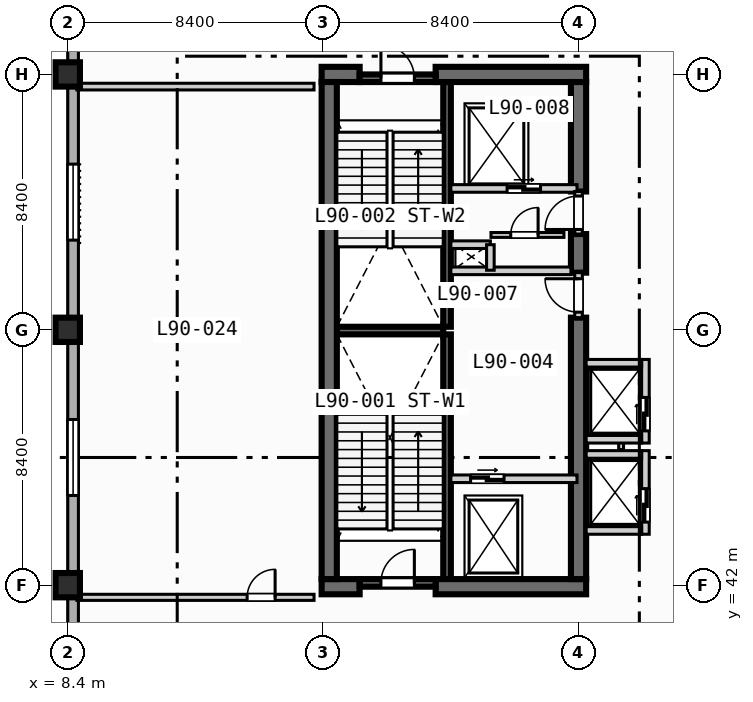
"""IFC4 building model, lengths in metres.
Left out: names, types, materials, properties, quantities, classifications, styles, units other than length and angle.
Written with IfcOpenShell. Run it as: python <this file> out.ifc"""

import sys

from ifc_helpers import new_model, si_unit, direction, frame, frame_2d, origin, origin_2d, place, context, subcontext, project, spatial, rectangle, extrude, element, fill, save


model = new_model("IFC4")
c1 = context("Model", 3, precision=1e-05, world=origin(), true_north=direction((0.0, 1.0)))
c2 = subcontext(c1, "Body", "Model", "MODEL_VIEW")
j1 = project(units=[si_unit("LENGTHUNIT", "METRE"), si_unit("PLANEANGLEUNIT", "RADIAN")], contexts=[c1])
p1 = place(None, origin())
s1 = spatial("IfcSite", under=j1, at=p1, CompositionType="ELEMENT")
p2 = place(p1, origin())
s2 = spatial("IfcBuilding", under=s1, at=p2, CompositionType="ELEMENT")
p3 = place(p2, frame((0.0, 0.0, 363.8)))
s3 = spatial("IfcBuildingStorey", under=s2, at=p3, CompositionType="ELEMENT", Elevation=363.8)
for number, where, z_axis, x_axis in (
    (1, (20.875, 42.2, 0.0), (0.0, 0.0, 1.0), (0.0, 1.0, 0.0)),
    (2, (20.875, 50.5, 0.0), (0.0, 0.0, 1.0), (0.0, 1.0, 0.0)),
):
    element("IfcWall", number, at=place(p3, frame(where, z_axis=z_axis, x_axis=x_axis)), inside=s3, PredefinedType="SOLIDWALL", context=c2, shape_type="SweptSolid", body=[
        extrude(rectangle(XDim=8.05, YDim=0.25, at=frame_2d((4.025, 0.0))), origin(), (0.0, 0.0, 1.0), 4.45),
    ])
p4 = place(p3, frame((17.25, 50.375, 0.0), z_axis=(0.0, 0.0, 1.0), x_axis=(1.0, 0.0, 0.0)))
e3 = element("IfcWall", 3, at=p4, inside=s3, PredefinedType="SOLIDWALL", context=c2, shape_type="SweptSolid", body=[
    extrude(rectangle(XDim=3.5, YDim=0.25, at=frame_2d((1.75, 0.0))), origin(), (0.0, 0.0, 1.0), 4.45),
])
p5 = place(p3, frame((16.75, 41.95, 0.0), z_axis=(0.0, 0.0, 1.0), x_axis=(1.0, 0.0, 0.0)))
e4 = element("IfcWall", 4, at=p5, inside=s3, PredefinedType="SHEAR", context=c2, shape_type="SweptSolid", body=[
    extrude(rectangle(XDim=1.25, YDim=0.5, at=frame_2d((0.625, 0.0))), origin(), (0.0, 0.0, 1.0), 4.45),
])
p6 = place(p3, frame((20.5, 41.95, 0.0), z_axis=(0.0, 0.0, 1.0), x_axis=(1.0, 0.0, 0.0)))
e5 = element("IfcWall", 5, at=p6, inside=s3, PredefinedType="SHEAR", context=c2, shape_type="SweptSolid", body=[
    extrude(rectangle(XDim=4.95, YDim=0.5, at=frame_2d((2.475, 0.0))), origin(), (0.0, 0.0, 1.0), 4.45),
])
p7 = place(p3, frame((16.75, 58.8, 0.0), z_axis=(0.0, 0.0, 1.0), x_axis=(1.0, 0.0, 0.0)))
e6 = element("IfcWall", 6, at=p7, inside=s3, PredefinedType="SHEAR", context=c2, shape_type="SweptSolid", body=[
    extrude(rectangle(XDim=1.25, YDim=0.5, at=frame_2d((0.625, 0.0))), origin(), (0.0, 0.0, 1.0), 4.45),
])
p8 = place(p3, frame((20.5, 58.8, 0.0), z_axis=(0.0, 0.0, 1.0), x_axis=(1.0, 0.0, 0.0)))
e7 = element("IfcWall", 7, at=p8, inside=s3, PredefinedType="SHEAR", context=c2, shape_type="SweptSolid", body=[
    extrude(rectangle(XDim=4.95, YDim=0.5, at=frame_2d((2.475, 0.0))), origin(), (0.0, 0.0, 1.0), 4.45),
])
p9 = place(p3, frame((17.0, 42.2, 0.0), z_axis=(0.0, 0.0, 1.0), x_axis=(0.0, 1.0, 0.0)))
e8 = element("IfcWall", 8, at=p9, inside=s3, PredefinedType="SHEAR", context=c2, shape_type="SweptSolid", body=[
    extrude(rectangle(XDim=16.35, YDim=0.5, at=frame_2d((8.175, 0.0))), origin(), (0.0, 0.0, 1.0), 4.45),
])
p10 = place(p3, frame((25.2, 42.2, 0.0), z_axis=(0.0, 0.0, 1.0), x_axis=(0.0, 1.0, 0.0)))
e9 = element("IfcWall", 9, at=p10, inside=s3, PredefinedType="SHEAR", context=c2, shape_type="SweptSolid", body=[
    extrude(rectangle(XDim=8.6, YDim=0.5, at=frame_2d((4.3, 0.0))), origin(), (0.0, 0.0, 1.0), 4.45),
])
p11 = place(p3, frame((25.2, 52.28, 0.0), z_axis=(0.0, 0.0, 1.0), x_axis=(0.0, 1.0, 0.0)))
e10 = element("IfcWall", 10, at=p11, inside=s3, PredefinedType="SHEAR", context=c2, shape_type="SweptSolid", body=[
    extrude(rectangle(XDim=1.27, YDim=0.5, at=frame_2d((0.635, 0.0))), origin(), (0.0, 0.0, 1.0), 4.45),
])
p12 = place(p3, frame((25.2, 54.95, 0.0), z_axis=(0.0, 0.0, 1.0), x_axis=(0.0, 1.0, 0.0)))
e11 = element("IfcWall", 11, at=p12, inside=s3, PredefinedType="SHEAR", context=c2, shape_type="SweptSolid", body=[
    extrude(rectangle(XDim=3.6, YDim=0.5, at=frame_2d((1.8, 0.0))), origin(), (0.0, 0.0, 1.0), 4.45),
])
for number, where, z_axis, x_axis in (
    (12, (8.4, 42.0, 0.0), (0.0, 0.0, 1.0), (1.0, 0.0, 0.0)),
    (13, (8.4, 50.4, 0.0), (0.0, 0.0, 1.0), (1.0, 0.0, 0.0)),
    (14, (8.4, 58.8, 0.0), (0.0, 0.0, 1.0), (1.0, 0.0, 0.0)),
):
    element("IfcColumn", number, at=place(p3, frame(where, z_axis=z_axis, x_axis=x_axis)), inside=s3, PredefinedType="COLUMN", context=c2, shape_type="SweptSolid", body=[
        extrude(rectangle(XDim=0.8, YDim=0.8, at=origin_2d()), origin(), (0.0, 0.0, 1.0), 4.8),
    ])
p13 = place(p3, frame((8.575, 11.575, 0.0), z_axis=(0.0, 0.0, 1.0), x_axis=(0.0, 1.0, 0.0)))
e15 = element("IfcWall", 15, at=p13, inside=s3, PredefinedType="STANDARD", context=c2, shape_type="SweptSolid", body=[
    extrude(rectangle(XDim=60.85, YDim=0.35, at=frame_2d((30.425, 0.0))), origin(), (0.0, 0.0, 1.0), 4.45),
])
p14 = place(p13, frame((8.175, 0.0, 0.85)))
e16 = element("IfcOpeningElement", 16, at=p14, cuts=e15, PredefinedType="OPENING", context=c2, shape_type="SweptSolid", body=[
    extrude(rectangle(XDim=2.5, YDim=2.2, at=frame_2d((1.25, 1.1))), frame((0.0, 0.185, 0.0), z_axis=(0.0, -1.0, 0.0), x_axis=(1.0, 0.0, 0.0)), (0.0, 0.0, 1.0), 0.37),
])
p15 = place(p13, frame((16.575, 0.0, 0.85)))
e17 = element("IfcOpeningElement", 17, at=p15, cuts=e15, PredefinedType="OPENING", context=c2, shape_type="SweptSolid", body=[
    extrude(rectangle(XDim=2.5, YDim=2.2, at=frame_2d((1.25, 1.1))), frame((0.0, 0.185, 0.0), z_axis=(0.0, -1.0, 0.0), x_axis=(1.0, 0.0, 0.0)), (0.0, 0.0, 1.0), 0.37),
])
p16 = place(p13, frame((24.975, 0.0, 0.85)))
e18 = element("IfcOpeningElement", 18, at=p16, cuts=e15, PredefinedType="OPENING", context=c2, shape_type="SweptSolid", body=[
    extrude(rectangle(XDim=2.5, YDim=2.2, at=frame_2d((1.25, 1.1))), frame((0.0, 0.185, 0.0), z_axis=(0.0, -1.0, 0.0), x_axis=(1.0, 0.0, 0.0)), (0.0, 0.0, 1.0), 0.37),
])
p17 = place(p13, frame((33.375, 0.0, 0.85)))
e19 = element("IfcOpeningElement", 19, at=p17, cuts=e15, PredefinedType="OPENING", context=c2, shape_type="SweptSolid", body=[
    extrude(rectangle(XDim=2.5, YDim=2.2, at=frame_2d((1.25, 1.1))), frame((0.0, 0.185, 0.0), z_axis=(0.0, -1.0, 0.0), x_axis=(1.0, 0.0, 0.0)), (0.0, 0.0, 1.0), 0.37),
])
p18 = place(p13, frame((41.775, 0.0, 0.85)))
e20 = element("IfcOpeningElement", 20, at=p18, cuts=e15, PredefinedType="OPENING", context=c2, shape_type="SweptSolid", body=[
    extrude(rectangle(XDim=2.5, YDim=2.2, at=frame_2d((1.25, 1.1))), frame((0.0, 0.185, 0.0), z_axis=(0.0, -1.0, 0.0), x_axis=(1.0, 0.0, 0.0)), (0.0, 0.0, 1.0), 0.37),
])
p19 = place(p3, frame((18.0, 42.075, 0.0), z_axis=(0.0, 0.0, 1.0), x_axis=(1.0, 0.0, 0.0)))
e21 = element("IfcWall", 21, at=p19, inside=s3, PredefinedType="SOLIDWALL", context=c2, shape_type="SweptSolid", body=[
    extrude(rectangle(XDim=2.5, YDim=0.25, at=frame_2d((1.25, 0.0))), origin(), (0.0, 0.0, 1.0), 4.45),
])
p20 = place(p19, frame((0.7, 0.0, 0.0)))
e22 = element("IfcOpeningElement", 22, at=p20, cuts=e21, PredefinedType="OPENING", context=c2, shape_type="SweptSolid", body=[
    extrude(rectangle(XDim=1.1, YDim=2.15, at=frame_2d((0.55, 1.075))), frame((0.0, 0.135, 0.0), z_axis=(0.0, -1.0, 0.0), x_axis=(1.0, 0.0, 0.0)), (0.0, 0.0, 1.0), 0.27),
])
p21 = place(p3, frame((18.0, 58.675, 0.0), z_axis=(0.0, 0.0, 1.0), x_axis=(1.0, 0.0, 0.0)))
e23 = element("IfcWall", 23, at=p21, inside=s3, PredefinedType="SOLIDWALL", context=c2, shape_type="SweptSolid", body=[
    extrude(rectangle(XDim=2.5, YDim=0.25, at=frame_2d((1.25, 0.0))), origin(), (0.0, 0.0, 1.0), 4.45),
])
p22 = place(p21, frame((0.7, 0.0, 0.0)))
e24 = element("IfcOpeningElement", 24, at=p22, cuts=e23, PredefinedType="OPENING", context=c2, shape_type="SweptSolid", body=[
    extrude(rectangle(XDim=1.1, YDim=2.15, at=frame_2d((0.55, 1.075))), frame((0.0, 0.135, 0.0), z_axis=(0.0, -1.0, 0.0), x_axis=(1.0, 0.0, 0.0)), (0.0, 0.0, 1.0), 0.27),
])
p23 = place(p3, frame((21.0, 45.5, 0.0), z_axis=(0.0, 0.0, 1.0), x_axis=(1.0, 0.0, 0.0)))
e25 = element("IfcWall", 25, at=p23, inside=s3, PredefinedType="SOLIDWALL", context=c2, shape_type="SweptSolid", body=[
    extrude(rectangle(XDim=4.15, YDim=0.25, at=frame_2d((2.075, 0.0))), origin(), (0.0, 0.0, 1.0), 4.45),
])
p24 = place(p23, frame((0.65, 0.0, 0.0)))
e26 = element("IfcOpeningElement", 26, at=p24, cuts=e25, PredefinedType="OPENING", context=c2, shape_type="SweptSolid", body=[
    extrude(rectangle(XDim=1.1, YDim=2.15, at=frame_2d((0.55, 1.075))), frame((0.0, 0.135, 0.0), z_axis=(0.0, -1.0, 0.0), x_axis=(1.0, 0.0, 0.0)), (0.0, 0.0, 1.0), 0.27),
])
p25 = place(p3, frame((25.2, 50.8, 0.0), z_axis=(0.0, 0.0, 1.0), x_axis=(0.0, 1.0, 0.0)))
e27 = element("IfcWall", 27, at=p25, inside=s3, PredefinedType="SOLIDWALL", context=c2, shape_type="SweptSolid", body=[
    extrude(rectangle(XDim=1.48, YDim=0.25, at=frame_2d((0.74, 0.0))), origin(), (0.0, 0.0, 1.0), 4.45),
])
p26 = place(p25, frame((0.18, 0.0, 0.0)))
e28 = element("IfcOpeningElement", 28, at=p26, cuts=e27, PredefinedType="OPENING", context=c2, shape_type="SweptSolid", body=[
    extrude(rectangle(XDim=1.1, YDim=2.15, at=frame_2d((0.55, 1.075))), frame((0.0, 0.135, 0.0), z_axis=(0.0, -1.0, 0.0), x_axis=(1.0, 0.0, 0.0)), (0.0, 0.0, 1.0), 0.27),
])
p27 = place(p3, frame((21.0, 52.34, 0.0), z_axis=(0.0, 0.0, 1.0), x_axis=(1.0, 0.0, 0.0)))
e29 = element("IfcWall", 29, at=p27, inside=s3, PredefinedType="SOLIDWALL", context=c2, shape_type="SweptSolid", body=[
    extrude(rectangle(XDim=3.95, YDim=0.25, at=frame_2d((1.975, 0.0))), origin(), (0.0, 0.0, 1.0), 4.45),
])
p28 = place(p3, frame((21.0, 55.05, 0.0), z_axis=(0.0, 0.0, 1.0), x_axis=(1.0, 0.0, 0.0)))
e30 = element("IfcWall", 30, at=p28, inside=s3, PredefinedType="SOLIDWALL", context=c2, shape_type="SweptSolid", body=[
    extrude(rectangle(XDim=4.15, YDim=0.25, at=frame_2d((2.075, 0.0))), origin(), (0.0, 0.0, 1.0), 4.45),
])
p29 = place(p28, frame((1.85, 0.0, 0.0)))
e31 = element("IfcOpeningElement", 31, at=p29, cuts=e30, PredefinedType="OPENING", context=c2, shape_type="SweptSolid", body=[
    extrude(rectangle(XDim=1.1, YDim=2.15, at=frame_2d((0.55, 1.075))), frame((0.0, 0.135, 0.0), z_axis=(0.0, -1.0, 0.0), x_axis=(1.0, 0.0, 0.0)), (0.0, 0.0, 1.0), 0.27),
])
p30 = place(p3, frame((25.2, 53.55, 0.0), z_axis=(0.0, 0.0, 1.0), x_axis=(0.0, 1.0, 0.0)))
e32 = element("IfcWall", 32, at=p30, inside=s3, PredefinedType="SOLIDWALL", context=c2, shape_type="SweptSolid", body=[
    extrude(rectangle(XDim=1.4, YDim=0.25, at=frame_2d((0.7, 0.0))), origin(), (0.0, 0.0, 1.0), 4.45),
])
p31 = place(p30, frame((0.15, 0.0, 0.0)))
e33 = element("IfcOpeningElement", 33, at=p31, cuts=e32, PredefinedType="OPENING", context=c2, shape_type="SweptSolid", body=[
    extrude(rectangle(XDim=1.1, YDim=2.15, at=frame_2d((0.55, 1.075))), frame((0.0, 0.135, 0.0), z_axis=(0.0, -1.0, 0.0), x_axis=(1.0, 0.0, 0.0)), (0.0, 0.0, 1.0), 0.27),
])
p32 = place(p3, frame((21.0, 53.2, 0.0), z_axis=(0.0, 0.0, 1.0), x_axis=(1.0, 0.0, 0.0)))
e34 = element("IfcWall", 34, at=p32, inside=s3, PredefinedType="SOLIDWALL", context=c2, shape_type="SweptSolid", body=[
    extrude(rectangle(XDim=1.3, YDim=0.25, at=frame_2d((0.65, 0.0))), origin(), (0.0, 0.0, 1.0), 4.45),
])
p33 = place(p3, frame((22.3, 52.36, 0.0), z_axis=(0.0, 0.0, 1.0), x_axis=(0.0, 1.0, 0.0)))
e35 = element("IfcWall", 35, at=p33, inside=s3, PredefinedType="SOLIDWALL", context=c2, shape_type="SweptSolid", body=[
    extrude(rectangle(XDim=0.84, YDim=0.25, at=frame_2d((0.42, 0.0))), origin(), (0.0, 0.0, 1.0), 4.45),
])
p34 = place(p3, frame((22.32, 53.52, 0.0), z_axis=(0.0, 0.0, 1.0), x_axis=(1.0, 0.0, 0.0)))
e36 = element("IfcWall", 36, at=p34, inside=s3, PredefinedType="PARTITIONING", context=c2, shape_type="SweptSolid", body=[
    extrude(rectangle(XDim=2.4, YDim=0.16, at=frame_2d((1.2, 0.0))), origin(), (0.0, 0.0, 1.0), 4.45),
])
p35 = place(p34, frame((0.65, 0.0, 0.0)))
e37 = element("IfcOpeningElement", 37, at=p35, cuts=e36, PredefinedType="OPENING", context=c2, shape_type="SweptSolid", body=[
    extrude(rectangle(XDim=0.9, YDim=2.1, at=frame_2d((0.45, 1.05))), frame((0.0, 0.09, 0.0), z_axis=(0.0, -1.0, 0.0), x_axis=(1.0, 0.0, 0.0)), (0.0, 0.0, 1.0), 0.18),
])
p36 = place(p3, frame((27.4, 43.675, 0.0), z_axis=(0.0, 0.0, 1.0), x_axis=(0.0, 1.0, 0.0)))
e38 = element("IfcWall", 38, at=p36, inside=s3, PredefinedType="SOLIDWALL", context=c2, shape_type="SweptSolid", body=[
    extrude(rectangle(XDim=2.75, YDim=0.25, at=frame_2d((1.375, 0.0))), origin(), (0.0, 0.0, 1.0), 4.45),
])
p37 = place(p36, frame((0.4, 0.0, 0.0)))
e39 = element("IfcOpeningElement", 39, at=p37, cuts=e38, PredefinedType="OPENING", context=c2, shape_type="SweptSolid", body=[
    extrude(rectangle(XDim=1.1, YDim=2.15, at=frame_2d((0.55, 1.075))), frame((0.0, 0.135, 0.0), z_axis=(0.0, -1.0, 0.0), x_axis=(1.0, 0.0, 0.0)), (0.0, 0.0, 1.0), 0.27),
])
for number, where, z_axis, x_axis in (
    (40, (25.45, 43.8, 0.0), (0.0, 0.0, 1.0), (1.0, 0.0, 0.0)),
    (41, (25.45, 46.3, 0.0), (0.0, 0.0, 1.0), (1.0, 0.0, 0.0)),
):
    element("IfcWall", number, at=place(p3, frame(where, z_axis=z_axis, x_axis=x_axis)), inside=s3, PredefinedType="SOLIDWALL", context=c2, shape_type="SweptSolid", body=[
        extrude(rectangle(XDim=1.825, YDim=0.25, at=frame_2d((0.913, 0.0))), origin(), (0.0, 0.0, 1.0), 4.45),
    ])
p38 = place(p3, frame((26.6, 46.46, 0.0), z_axis=(0.0, 0.0, 1.0), x_axis=(0.0, 1.0, 0.0)))
e42 = element("IfcWall", 42, at=p38, inside=s3, PredefinedType="PARTITIONING", context=c2, shape_type="SweptSolid", body=[
    extrude(rectangle(XDim=0.88, YDim=0.16, at=frame_2d((0.44, 0.0))), origin(), (0.0, 0.0, 1.0), 4.45),
])
p39 = place(p3, frame((27.4, 46.675, 0.0), z_axis=(0.0, 0.0, 1.0), x_axis=(0.0, 1.0, 0.0)))
e43 = element("IfcWall", 43, at=p39, inside=s3, PredefinedType="SOLIDWALL", context=c2, shape_type="SweptSolid", body=[
    extrude(rectangle(XDim=2.75, YDim=0.25, at=frame_2d((1.375, 0.0))), origin(), (0.0, 0.0, 1.0), 4.45),
])
p40 = place(p39, frame((0.4, 0.0, 0.0)))
e44 = element("IfcOpeningElement", 44, at=p40, cuts=e43, PredefinedType="OPENING", context=c2, shape_type="SweptSolid", body=[
    extrude(rectangle(XDim=1.1, YDim=2.15, at=frame_2d((0.55, 1.075))), frame((0.0, 0.135, 0.0), z_axis=(0.0, -1.0, 0.0), x_axis=(1.0, 0.0, 0.0)), (0.0, 0.0, 1.0), 0.27),
])
for number, where, z_axis, x_axis in (
    (45, (25.45, 46.8, 0.0), (0.0, 0.0, 1.0), (1.0, 0.0, 0.0)),
    (46, (25.45, 49.3, 0.0), (0.0, 0.0, 1.0), (1.0, 0.0, 0.0)),
):
    element("IfcWall", number, at=place(p3, frame(where, z_axis=z_axis, x_axis=x_axis)), inside=s3, PredefinedType="SOLIDWALL", context=c2, shape_type="SweptSolid", body=[
        extrude(rectangle(XDim=1.825, YDim=0.25, at=frame_2d((0.913, 0.0))), origin(), (0.0, 0.0, 1.0), 4.45),
    ])
p41 = place(p3, frame((8.7, 41.6, 0.0), z_axis=(0.0, 0.0, 1.0), x_axis=(1.0, 0.0, 0.0)))
e47 = element("IfcWall", 47, at=p41, inside=s3, PredefinedType="PARTITIONING", context=c2, shape_type="SweptSolid", body=[
    extrude(rectangle(XDim=7.8, YDim=0.2, at=frame_2d((3.9, 0.0))), origin(), (0.0, 0.0, 1.0), 4.45),
])
p42 = place(p41, frame((5.6, 0.0, 0.0)))
e48 = element("IfcOpeningElement", 48, at=p42, cuts=e47, PredefinedType="OPENING", context=c2, shape_type="SweptSolid", body=[
    extrude(rectangle(XDim=0.92, YDim=2.1, at=frame_2d((0.46, 1.05))), frame((0.0, 0.11, 0.0), z_axis=(0.0, -1.0, 0.0), x_axis=(1.0, 0.0, 0.0)), (0.0, 0.0, 1.0), 0.22),
])
p43 = place(p3, frame((8.7, 58.4, 0.0), z_axis=(0.0, 0.0, 1.0), x_axis=(1.0, 0.0, 0.0)))
e49 = element("IfcWall", 49, at=p43, inside=s3, PredefinedType="PARTITIONING", context=c2, shape_type="SweptSolid", body=[
    extrude(rectangle(XDim=7.8, YDim=0.22, at=frame_2d((3.9, 0.0))), origin(), (0.0, 0.0, 1.0), 4.45),
])
p44 = place(p17, origin())
e50 = element("IfcWindow", 50, at=p44, inside=s3, PartitioningType="SINGLE_PANEL", PredefinedType="WINDOW", context=c2, shape_type="SweptSolid", body=[
    extrude(rectangle(XDim=2.5, YDim=2.2, at=frame_2d((1.25, 1.1))), frame((0.0, 0.03, 0.0), z_axis=(0.0, -1.0, 0.0), x_axis=(1.0, 0.0, 0.0)), (0.0, 0.0, 1.0), 0.06),
])
fill(e19, e50)
p45 = place(p18, origin())
e51 = element("IfcWindow", 51, at=p45, inside=s3, PartitioningType="SINGLE_PANEL", PredefinedType="WINDOW", context=c2, shape_type="SweptSolid", body=[
    extrude(rectangle(XDim=2.5, YDim=2.2, at=frame_2d((1.25, 1.1))), frame((0.0, 0.03, 0.0), z_axis=(0.0, -1.0, 0.0), x_axis=(1.0, 0.0, 0.0)), (0.0, 0.0, 1.0), 0.06),
])
fill(e20, e51)
p46 = place(p20, origin())
e52 = element("IfcDoor", 52, at=p46, inside=s3, OperationType="SINGLE_SWING_RIGHT", PredefinedType="DOOR", context=c2, shape_type="SweptSolid", body=[
    extrude(rectangle(XDim=1.1, YDim=2.15, at=frame_2d((0.55, 1.075))), frame((0.0, 0.025, 0.0), z_axis=(0.0, -1.0, 0.0), x_axis=(1.0, 0.0, 0.0)), (0.0, 0.0, 1.0), 0.05),
])
fill(e22, e52)
p47 = place(p22, origin())
e53 = element("IfcDoor", 53, at=p47, inside=s3, OperationType="SINGLE_SWING_LEFT", PredefinedType="DOOR", context=c2, shape_type="SweptSolid", body=[
    extrude(rectangle(XDim=1.1, YDim=2.15, at=frame_2d((0.55, 1.075))), frame((0.0, 0.025, 0.0), z_axis=(0.0, -1.0, 0.0), x_axis=(1.0, 0.0, 0.0)), (0.0, 0.0, 1.0), 0.05),
])
fill(e24, e53)
p48 = place(p24, origin())
e54 = element("IfcDoor", 54, at=p48, inside=s3, OperationType="SLIDING_TO_LEFT", PredefinedType="DOOR", context=c2, shape_type="SweptSolid", body=[
    extrude(rectangle(XDim=1.1, YDim=2.15, at=frame_2d((0.55, 1.075))), frame((0.0, 0.025, 0.0), z_axis=(0.0, -1.0, 0.0), x_axis=(1.0, 0.0, 0.0)), (0.0, 0.0, 1.0), 0.05),
])
fill(e26, e54)
p49 = place(p26, origin())
e55 = element("IfcDoor", 55, at=p49, inside=s3, OperationType="SINGLE_SWING_RIGHT", PredefinedType="DOOR", context=c2, shape_type="SweptSolid", body=[
    extrude(rectangle(XDim=1.1, YDim=2.15, at=frame_2d((0.55, 1.075))), frame((0.0, 0.025, 0.0), z_axis=(0.0, -1.0, 0.0), x_axis=(1.0, 0.0, 0.0)), (0.0, 0.0, 1.0), 0.05),
])
fill(e28, e55)
p50 = place(p29, origin())
e56 = element("IfcDoor", 56, at=p50, inside=s3, OperationType="SLIDING_TO_LEFT", PredefinedType="DOOR", context=c2, shape_type="SweptSolid", body=[
    extrude(rectangle(XDim=1.1, YDim=2.15, at=frame_2d((0.55, 1.075))), frame((0.0, 0.025, 0.0), z_axis=(0.0, -1.0, 0.0), x_axis=(1.0, 0.0, 0.0)), (0.0, 0.0, 1.0), 0.05),
])
fill(e31, e56)
p51 = place(p31, origin())
e57 = element("IfcDoor", 57, at=p51, inside=s3, OperationType="SINGLE_SWING_LEFT", PredefinedType="DOOR", context=c2, shape_type="SweptSolid", body=[
    extrude(rectangle(XDim=1.1, YDim=2.15, at=frame_2d((0.55, 1.075))), frame((0.0, 0.025, 0.0), z_axis=(0.0, -1.0, 0.0), x_axis=(1.0, 0.0, 0.0)), (0.0, 0.0, 1.0), 0.05),
])
fill(e33, e57)
p52 = place(p35, origin())
e58 = element("IfcDoor", 58, at=p52, inside=s3, OperationType="SINGLE_SWING_RIGHT", PredefinedType="DOOR", context=c2, shape_type="SweptSolid", body=[
    extrude(rectangle(XDim=0.9, YDim=2.1, at=frame_2d((0.45, 1.05))), frame((0.0, 0.025, 0.0), z_axis=(0.0, -1.0, 0.0), x_axis=(1.0, 0.0, 0.0)), (0.0, 0.0, 1.0), 0.05),
])
fill(e37, e58)
p53 = place(p37, origin())
e59 = element("IfcDoor", 59, at=p53, inside=s3, OperationType="SLIDING_TO_LEFT", PredefinedType="DOOR", context=c2, shape_type="SweptSolid", body=[
    extrude(rectangle(XDim=1.1, YDim=2.15, at=frame_2d((0.55, 1.075))), frame((0.0, 0.025, 0.0), z_axis=(0.0, -1.0, 0.0), x_axis=(1.0, 0.0, 0.0)), (0.0, 0.0, 1.0), 0.05),
])
fill(e39, e59)
p54 = place(p40, origin())
e60 = element("IfcDoor", 60, at=p54, inside=s3, OperationType="SLIDING_TO_LEFT", PredefinedType="DOOR", context=c2, shape_type="SweptSolid", body=[
    extrude(rectangle(XDim=1.1, YDim=2.15, at=frame_2d((0.55, 1.075))), frame((0.0, 0.025, 0.0), z_axis=(0.0, -1.0, 0.0), x_axis=(1.0, 0.0, 0.0)), (0.0, 0.0, 1.0), 0.05),
])
fill(e44, e60)
p55 = place(p42, origin())
e61 = element("IfcDoor", 61, at=p55, inside=s3, OperationType="SINGLE_SWING_RIGHT", PredefinedType="DOOR", context=c2, shape_type="SweptSolid", body=[
    extrude(rectangle(XDim=0.92, YDim=2.1, at=frame_2d((0.46, 1.05))), frame((0.0, 0.025, 0.0), z_axis=(0.0, -1.0, 0.0), x_axis=(1.0, 0.0, 0.0)), (0.0, 0.0, 1.0), 0.05),
])
fill(e48, e61)
save(model, sys.argv[1])
